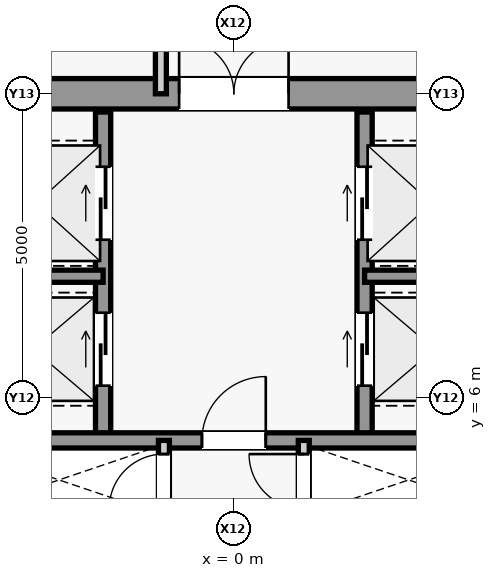
"""IFC4 building model, lengths in metres.
Left out: names, types, materials, properties, quantities, classifications, styles, units other than length and angle.
Written with IfcOpenShell. Run it as: python <this file> out.ifc"""

import sys

from ifc_helpers import new_model, si_unit, direction, frame, frame_2d, origin, place, context, subcontext, project, spatial, rectangle, extrude, source, transform, mapped, element, fill, save


model = new_model("IFC4")
c1 = context("Model", 3, precision=1e-05, world=origin(), true_north=direction((0.0, 1.0)))
c2 = subcontext(c1, "Body", "Model", "MODEL_VIEW")
j1 = project(units=[si_unit("LENGTHUNIT", "METRE"), si_unit("PLANEANGLEUNIT", "RADIAN")], contexts=[c1])
p1 = place(None, origin())
s1 = spatial("IfcSite", under=j1, at=p1, CompositionType="ELEMENT")
p2 = place(p1, origin())
s2 = spatial("IfcBuilding", under=s1, at=p2, CompositionType="ELEMENT")
p3 = place(p2, frame((0.0, 0.0, 155.1)))
s3 = spatial("IfcBuildingStorey", under=s2, at=p3, CompositionType="ELEMENT", Elevation=155.1)
m1 = source(origin(), c2, "Body", "SweptSolid", [
    extrude(rectangle(XDim=9.2, YDim=0.5, at=frame_2d((4.6, 0.0))), origin(), (0.0, 0.0, 1.0), 3.78),
])
p4 = place(p3, frame((-4.6, 11.0, 0.0), z_axis=(0.0, 0.0, 1.0), x_axis=(1.0, 0.0, 0.0)))
e1 = element("IfcWall", 1, at=p4, inside=s3, PredefinedType="SHEAR", context=c2, shape_type="MappedRepresentation", body=[
    mapped(m1, transform((0.0, 0.0, 0.0), scale=1.0)),
])
m2 = source(origin(), c2, "Body", "SweptSolid", [
    extrude(rectangle(XDim=1.8, YDim=2.25, at=frame_2d((0.9, 1.125))), frame((0.0, 0.26, 0.0), z_axis=(0.0, -1.0, 0.0), x_axis=(1.0, 0.0, 0.0)), (0.0, 0.0, 1.0), 0.52),
])
p5 = place(p4, frame((3.7, 0.0, 0.0)))
e2 = element("IfcOpeningElement", 2, at=p5, cuts=e1, PredefinedType="OPENING", context=c2, shape_type="MappedRepresentation", body=[
    mapped(m2, transform((0.0, 0.0, 0.0), scale=1.0)),
])
m3 = source(origin(), c2, "Body", "SweptSolid", [
    extrude(rectangle(XDim=5.4, YDim=0.25, at=frame_2d((2.7, 0.0))), origin(), (0.0, 0.0, 1.0), 3.78),
])
p6 = place(p3, frame((-2.15, 5.3, 0.0), z_axis=(0.0, 0.0, 1.0), x_axis=(0.0, 1.0, 0.0)))
e3 = element("IfcWall", 3, at=p6, inside=s3, PredefinedType="SHEAR", context=c2, shape_type="MappedRepresentation", body=[
    mapped(m3, transform((0.0, 0.0, 0.0), scale=1.0)),
])
m4 = source(origin(), c2, "Body", "SweptSolid", [
    extrude(rectangle(XDim=1.2, YDim=2.3, at=frame_2d((0.6, 1.15))), frame((0.0, 0.135, 0.0), z_axis=(0.0, -1.0, 0.0), x_axis=(1.0, 0.0, 0.0)), (0.0, 0.0, 1.0), 0.27),
])
p7 = place(p6, frame((3.3, 0.0, 0.0)))
e4 = element("IfcOpeningElement", 4, at=p7, cuts=e3, PredefinedType="OPENING", context=c2, shape_type="MappedRepresentation", body=[
    mapped(m4, transform((0.0, 0.0, 0.0), scale=1.0)),
])
p8 = place(p6, frame((0.9, 0.0, 0.0)))
e5 = element("IfcOpeningElement", 5, at=p8, cuts=e3, PredefinedType="OPENING", context=c2, shape_type="MappedRepresentation", body=[
    mapped(m4, transform((0.0, 0.0, 0.0), scale=1.0)),
])
p9 = place(p3, frame((2.15, 5.3, 0.0), z_axis=(0.0, 0.0, 1.0), x_axis=(0.0, 1.0, 0.0)))
e6 = element("IfcWall", 6, at=p9, inside=s3, PredefinedType="SHEAR", context=c2, shape_type="MappedRepresentation", body=[
    mapped(m3, transform((0.0, 0.0, 0.0), scale=1.0)),
])
p10 = place(p9, frame((3.3, 0.0, 0.0)))
e7 = element("IfcOpeningElement", 7, at=p10, cuts=e6, PredefinedType="OPENING", context=c2, shape_type="MappedRepresentation", body=[
    mapped(m4, transform((0.0, 0.0, 0.0), scale=1.0)),
])
p11 = place(p9, frame((0.9, 0.0, 0.0)))
e8 = element("IfcOpeningElement", 8, at=p11, cuts=e6, PredefinedType="OPENING", context=c2, shape_type="MappedRepresentation", body=[
    mapped(m4, transform((0.0, 0.0, 0.0), scale=1.0)),
])
m5 = source(origin(), c2, "Body", "SweptSolid", [
    extrude(rectangle(XDim=2.45, YDim=0.2, at=frame_2d((1.225, 0.0))), origin(), (0.0, 0.0, 1.0), 3.78),
])
for number, where, z_axis, x_axis in (
    (9, (-4.6, 8.0, 0.0), (0.0, 0.0, 1.0), (1.0, 0.0, 0.0)),
    (10, (2.15, 8.0, 0.0), (0.0, 0.0, 1.0), (1.0, 0.0, 0.0)),
):
    element("IfcWall", number, at=place(p3, frame(where, z_axis=z_axis, x_axis=x_axis)), inside=s3, PredefinedType="SHEAR", context=c2, shape_type="MappedRepresentation", body=[
        mapped(m5, transform((0.0, 0.0, 0.0), scale=1.0)),
    ])
m6 = source(origin(), c2, "Body", "SweptSolid", [
    extrude(rectangle(XDim=9.2, YDim=0.25, at=frame_2d((4.6, 0.0))), origin(), (0.0, 0.0, 1.0), 3.78),
])
p12 = place(p3, frame((-4.6, 5.3, 0.0), z_axis=(0.0, 0.0, 1.0), x_axis=(1.0, 0.0, 0.0)))
e11 = element("IfcWall", 11, at=p12, inside=s3, PredefinedType="SHEAR", context=c2, shape_type="MappedRepresentation", body=[
    mapped(m6, transform((0.0, 0.0, 0.0), scale=1.0)),
])
m7 = source(origin(), c2, "Body", "SweptSolid", [
    extrude(rectangle(XDim=1.05, YDim=2.2, at=frame_2d((0.525, 1.1))), frame((0.0, 0.135, 0.0), z_axis=(0.0, -1.0, 0.0), x_axis=(1.0, 0.0, 0.0)), (0.0, 0.0, 1.0), 0.27),
])
p13 = place(p12, frame((4.075, 0.0, 0.0)))
e12 = element("IfcOpeningElement", 12, at=p13, cuts=e11, PredefinedType="OPENING", context=c2, shape_type="MappedRepresentation", body=[
    mapped(m7, transform((0.0, 0.0, 0.0), scale=1.0)),
])
m8 = source(origin(), c2, "Body", "SweptSolid", [
    extrude(rectangle(XDim=10.6, YDim=0.18, at=frame_2d((5.3, 0.0))), origin(), (0.0, 0.0, 1.0), 3.78),
])
p14 = place(p3, frame((-1.15, -5.3, 0.0), z_axis=(0.0, 0.0, 1.0), x_axis=(0.0, 1.0, 0.0)))
e13 = element("IfcWall", 13, at=p14, inside=s3, PredefinedType="PARTITIONING", context=c2, shape_type="MappedRepresentation", body=[
    mapped(m8, transform((0.0, 0.0, 0.0), scale=1.0)),
])
m9 = source(origin(), c2, "Body", "SweptSolid", [
    extrude(rectangle(XDim=0.9, YDim=2.15, at=frame_2d((0.45, 1.075))), frame((0.0, 0.1, 0.0), z_axis=(0.0, -1.0, 0.0), x_axis=(1.0, 0.0, 0.0)), (0.0, 0.0, 1.0), 0.2),
])
p15 = place(p14, frame((0.9, 0.0, 0.0)))
e14 = element("IfcOpeningElement", 14, at=p15, cuts=e13, PredefinedType="OPENING", context=c2, shape_type="MappedRepresentation", body=[
    mapped(m9, transform((0.0, 0.0, 0.0), scale=1.0)),
])
p16 = place(p14, frame((3.65, 0.0, 0.0)))
e15 = element("IfcOpeningElement", 15, at=p16, cuts=e13, PredefinedType="OPENING", context=c2, shape_type="MappedRepresentation", body=[
    mapped(m9, transform((0.0, 0.0, 0.0), scale=1.0)),
])
p17 = place(p14, frame((6.35, 0.0, 0.0)))
e16 = element("IfcOpeningElement", 16, at=p17, cuts=e13, PredefinedType="OPENING", context=c2, shape_type="MappedRepresentation", body=[
    mapped(m9, transform((0.0, 0.0, 0.0), scale=1.0)),
])
p18 = place(p14, frame((8.25, 0.0, 0.0)))
e17 = element("IfcOpeningElement", 17, at=p18, cuts=e13, PredefinedType="OPENING", context=c2, shape_type="MappedRepresentation", body=[
    mapped(m9, transform((0.0, 0.0, 0.0), scale=1.0)),
])
p19 = place(p14, frame((9.475, 0.0, 0.0)))
e18 = element("IfcOpeningElement", 18, at=p19, cuts=e13, PredefinedType="OPENING", context=c2, shape_type="MappedRepresentation", body=[
    mapped(m9, transform((0.0, 0.0, 0.0), scale=1.0)),
])
p20 = place(p3, frame((1.15, -5.3, 0.0), z_axis=(0.0, 0.0, 1.0), x_axis=(0.0, 1.0, 0.0)))
e19 = element("IfcWall", 19, at=p20, inside=s3, PredefinedType="PARTITIONING", context=c2, shape_type="MappedRepresentation", body=[
    mapped(m8, transform((0.0, 0.0, 0.0), scale=1.0)),
])
p21 = place(p20, frame((2.6, 0.0, 0.0)))
e20 = element("IfcOpeningElement", 20, at=p21, cuts=e19, PredefinedType="OPENING", context=c2, shape_type="MappedRepresentation", body=[
    mapped(m9, transform((0.0, 0.0, 0.0), scale=1.0)),
])
p22 = place(p20, frame((7.25, 0.0, 0.0)))
e21 = element("IfcOpeningElement", 21, at=p22, cuts=e19, PredefinedType="OPENING", context=c2, shape_type="MappedRepresentation", body=[
    mapped(m9, transform((0.0, 0.0, 0.0), scale=1.0)),
])
p23 = place(p20, frame((9.475, 0.0, 0.0)))
e22 = element("IfcOpeningElement", 22, at=p23, cuts=e19, PredefinedType="OPENING", context=c2, shape_type="MappedRepresentation", body=[
    mapped(m9, transform((0.0, 0.0, 0.0), scale=1.0)),
])
m10 = source(origin(), c2, "Body", "SweptSolid", [
    extrude(rectangle(XDim=2.5, YDim=0.18, at=frame_2d((1.25, 0.0))), origin(), (0.0, 0.0, 1.0), 3.78),
])
p24 = place(p3, frame((-1.2, 11.0, 0.0), z_axis=(0.0, 0.0, 1.0), x_axis=(0.0, 1.0, 0.0)))
e23 = element("IfcWall", 23, at=p24, inside=s3, PredefinedType="PARTITIONING", context=c2, shape_type="MappedRepresentation", body=[
    mapped(m10, transform((0.0, 0.0, 0.0), scale=1.0)),
])
m11 = source(origin(), c2, "Body", "SweptSolid", [
    extrude(rectangle(XDim=1.05, YDim=2.2, at=frame_2d((0.525, 1.1))), frame((0.0, 0.025, 0.0), z_axis=(0.0, -1.0, 0.0), x_axis=(1.0, 0.0, 0.0)), (0.0, 0.0, 1.0), 0.05),
])
p25 = place(p13, origin())
e24 = element("IfcDoor", 24, at=p25, inside=s3, OperationType="SINGLE_SWING_RIGHT", PredefinedType="DOOR", context=c2, shape_type="MappedRepresentation", body=[
    mapped(m11, transform((0.0, 0.0, 0.0), scale=1.0)),
])
fill(e12, e24)
m12 = source(origin(), c2, "Body", "SweptSolid", [
    extrude(rectangle(XDim=1.8, YDim=2.25, at=frame_2d((0.9, 1.125))), frame((0.0, 0.025, 0.0), z_axis=(0.0, -1.0, 0.0), x_axis=(1.0, 0.0, 0.0)), (0.0, 0.0, 1.0), 0.05),
])
p26 = place(p5, origin())
e25 = element("IfcDoor", 25, at=p26, inside=s3, OperationType="SINGLE_SWING_RIGHT", PredefinedType="DOOR", context=c2, shape_type="MappedRepresentation", body=[
    mapped(m12, transform((0.0, 0.0, 0.0), scale=1.0)),
])
fill(e2, e25)
m13 = source(origin(), c2, "Body", "SweptSolid", [
    extrude(rectangle(XDim=0.9, YDim=2.15, at=frame_2d((0.45, 1.075))), frame((0.0, 0.025, 0.0), z_axis=(0.0, -1.0, 0.0), x_axis=(1.0, 0.0, 0.0)), (0.0, 0.0, 1.0), 0.05),
])
p27 = place(p19, origin())
e26 = element("IfcDoor", 26, at=p27, inside=s3, OperationType="SINGLE_SWING_LEFT", PredefinedType="DOOR", context=c2, shape_type="MappedRepresentation", body=[
    mapped(m13, transform((0.0, 0.0, 0.0), scale=1.0)),
])
fill(e18, e26)
p28 = place(p23, origin())
e27 = element("IfcDoor", 27, at=p28, inside=s3, OperationType="SINGLE_SWING_RIGHT", PredefinedType="DOOR", context=c2, shape_type="MappedRepresentation", body=[
    mapped(m13, transform((0.0, 0.0, 0.0), scale=1.0)),
])
fill(e22, e27)
m14 = source(origin(), c2, "Body", "SweptSolid", [
    extrude(rectangle(XDim=1.2, YDim=2.3, at=frame_2d((0.6, 1.15))), frame((0.0, 0.025, 0.0), z_axis=(0.0, -1.0, 0.0), x_axis=(1.0, 0.0, 0.0)), (0.0, 0.0, 1.0), 0.05),
])
p29 = place(p7, origin())
e28 = element("IfcDoor", 28, at=p29, inside=s3, OperationType="SLIDING_TO_LEFT", PredefinedType="DOOR", context=c2, shape_type="MappedRepresentation", body=[
    mapped(m14, transform((0.0, 0.0, 0.0), scale=1.0)),
])
fill(e4, e28)
p30 = place(p10, origin())
e29 = element("IfcDoor", 29, at=p30, inside=s3, OperationType="SLIDING_TO_LEFT", PredefinedType="DOOR", context=c2, shape_type="MappedRepresentation", body=[
    mapped(m14, transform((0.0, 0.0, 0.0), scale=1.0)),
])
fill(e7, e29)
p31 = place(p8, origin())
e30 = element("IfcDoor", 30, at=p31, inside=s3, OperationType="SLIDING_TO_LEFT", PredefinedType="DOOR", context=c2, shape_type="MappedRepresentation", body=[
    mapped(m14, transform((0.0, 0.0, 0.0), scale=1.0)),
])
fill(e5, e30)
p32 = place(p11, origin())
e31 = element("IfcDoor", 31, at=p32, inside=s3, OperationType="SLIDING_TO_LEFT", PredefinedType="DOOR", context=c2, shape_type="MappedRepresentation", body=[
    mapped(m14, transform((0.0, 0.0, 0.0), scale=1.0)),
])
fill(e8, e31)
save(model, sys.argv[1])
